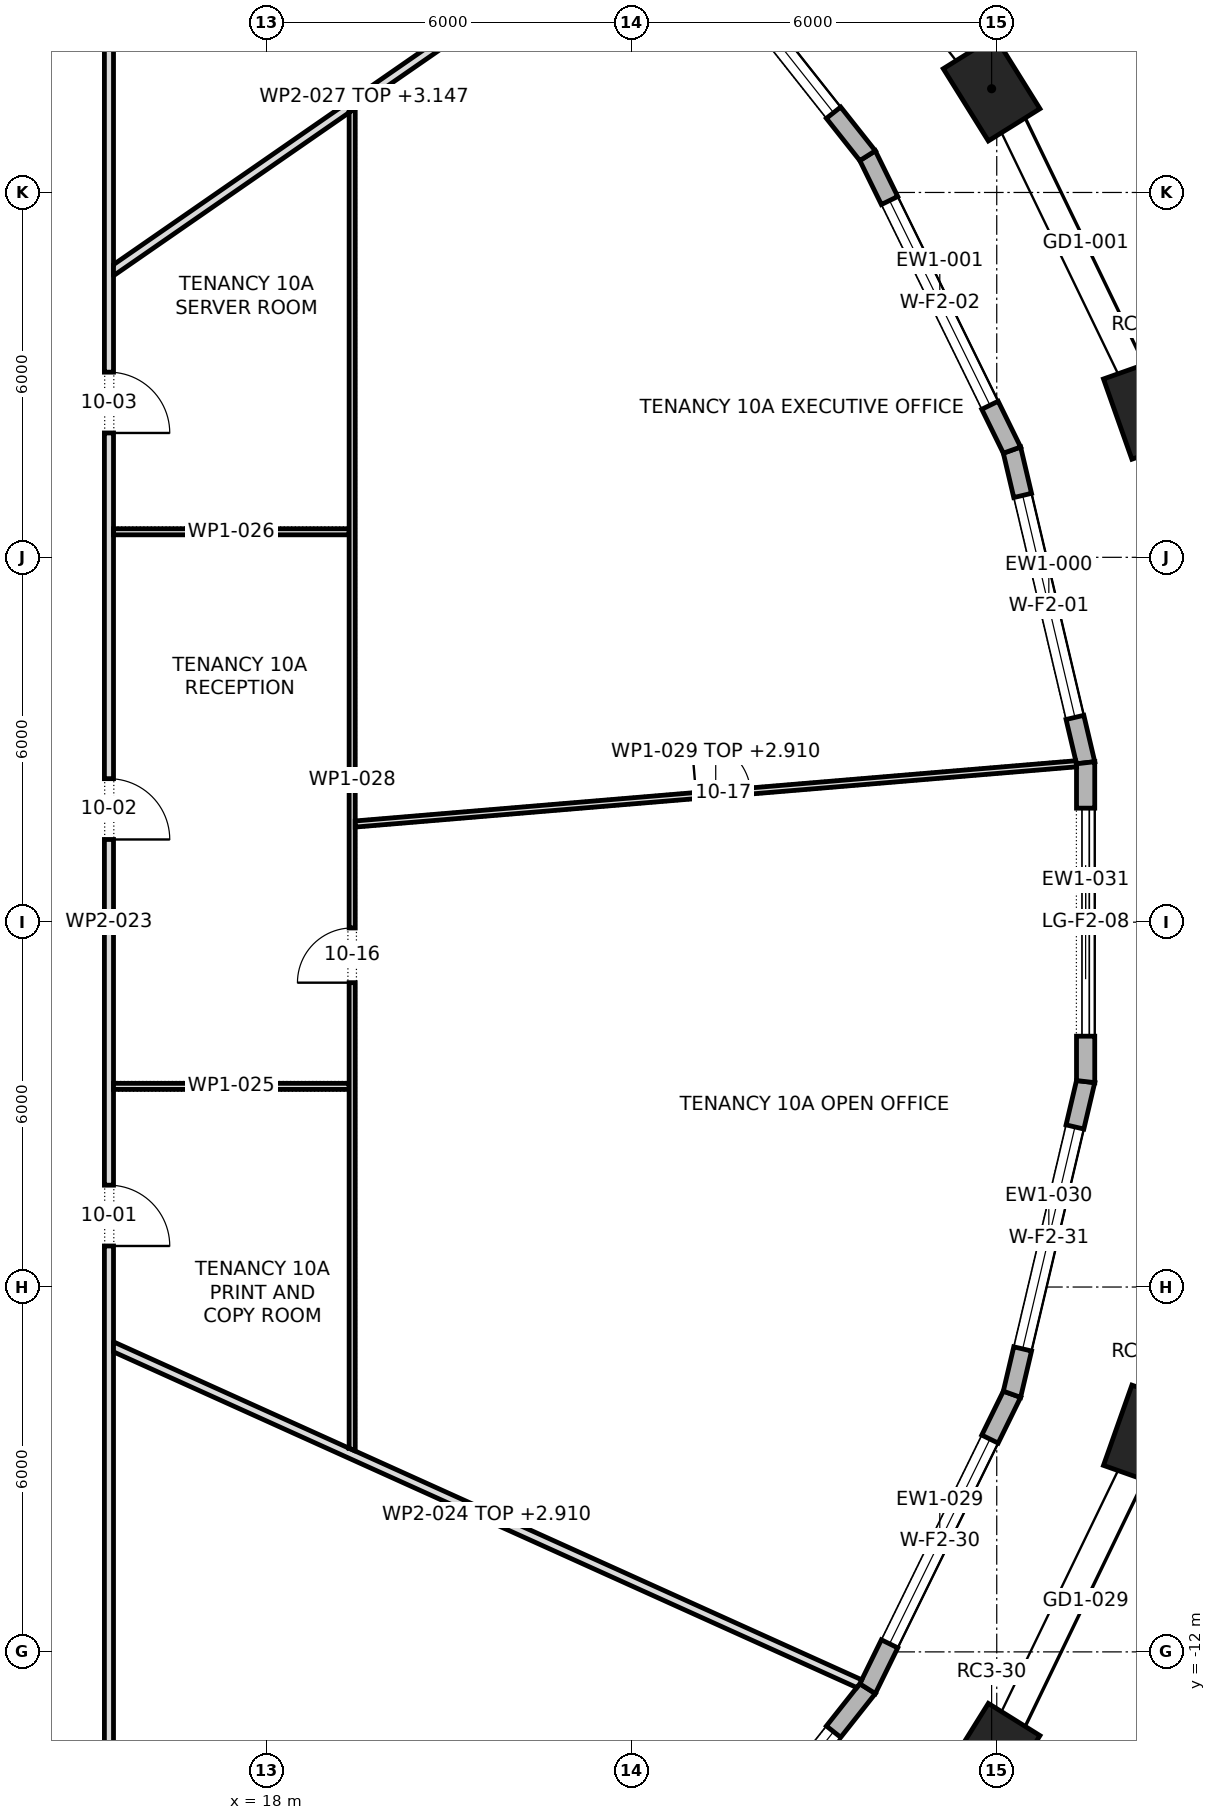
"""IFC4 building model, lengths in metres.
Left out: names, types, materials, properties, quantities, classifications, styles, units other than length and angle.
Written with IfcOpenShell. Run it as: python <this file> out.ifc"""

import sys

from ifc_helpers import new_model, si_unit, direction, frame, frame_2d, origin, origin_2d, place, context, subcontext, project, spatial, polyline, rectangle, outline, extrude, element, fill, save


model = new_model("IFC4")
c1 = context("Model", 3, precision=1e-05, world=origin(), true_north=direction((0.0, 1.0)))
c2 = subcontext(c1, "Body", "Model", "MODEL_VIEW")
j1 = project(units=[si_unit("LENGTHUNIT", "METRE"), si_unit("PLANEANGLEUNIT", "RADIAN")], contexts=[c1])
p1 = place(None, origin())
s1 = spatial("IfcSite", under=j1, at=p1, CompositionType="ELEMENT")
p2 = place(p1, origin())
s2 = spatial("IfcBuilding", under=s1, at=p2, CompositionType="ELEMENT")
p3 = place(p2, frame((0.0, 0.0, 150.7)))
s3 = spatial("IfcBuildingStorey", under=s2, at=p3, CompositionType="ELEMENT", Elevation=150.7)
for number, where, z_axis, x_axis in (
    (1, (32.46, 8.44, 0.0), (0.0, 0.0, 1.0), (-0.334, 0.943, 0.0)),
    (2, (29.916, 13.706, 0.0), (0.0, 0.0, 1.0), (-0.529, 0.849, 0.0)),
    (3, (29.916, -13.706, 0.0), (0.0, 0.0, 1.0), (0.529, 0.849, 0.0)),
    (4, (32.46, -8.44, 0.0), (0.0, 0.0, 1.0), (0.334, 0.943, 0.0)),
):
    element("IfcColumn", number, at=place(p3, frame(where, z_axis=z_axis, x_axis=x_axis)), inside=s3, PredefinedType="COLUMN", context=c2, shape_type="SweptSolid", body=[
        extrude(rectangle(XDim=1.4, YDim=1.0, at=origin_2d()), origin(), (0.0, 0.0, 1.0), 4.2),
    ])
p4 = place(p3, frame((31.462, 2.622, 0.0), z_axis=(0.0, 0.0, 1.0), x_axis=(-0.229289208312, 0.973358340464, 0.0)))
e5 = element("IfcWall", 5, at=p4, inside=s3, PredefinedType="STANDARD", context=c2, shape_type="SweptSolid", body=[
    extrude(outline(polyline([(-0.017, -0.15), (5.299, -0.15), (5.265, 0.15), (0.017, 0.15), (-0.017, -0.15)])), origin(), (0.0, 0.0, 1.0), 3.9),
])
p5 = place(p4, frame((0.766, 0.0, 0.6)))
e6 = element("IfcOpeningElement", 6, at=p5, cuts=e5, PredefinedType="OPENING", context=c2, shape_type="SweptSolid", body=[
    extrude(rectangle(XDim=3.75, YDim=2.85, at=frame_2d((1.875, 1.425))), frame((0.0, 0.162, 0.0), z_axis=(0.0, -1.0, 0.0), x_axis=(1.0, 0.0, 0.0)), (0.0, 0.0, 1.0), 0.324),
])
p6 = place(p3, frame((30.25, 7.763, 0.0), z_axis=(0.0, 0.0, 1.0), x_axis=(-0.440373354088, 0.897814740918, 0.0)))
e7 = element("IfcWall", 7, at=p6, inside=s3, PredefinedType="STANDARD", context=c2, shape_type="SweptSolid", body=[
    extrude(outline(polyline([(-0.017, -0.15), (5.409, -0.15), (5.376, 0.15), (0.017, 0.15), (-0.017, -0.15)])), origin(), (0.0, 0.0, 1.0), 3.9),
])
p7 = place(p6, frame((0.821, 0.0, 0.6)))
e8 = element("IfcOpeningElement", 8, at=p7, cuts=e7, PredefinedType="OPENING", context=c2, shape_type="SweptSolid", body=[
    extrude(rectangle(XDim=3.75, YDim=2.85, at=frame_2d((1.875, 1.425))), frame((0.0, 0.162, 0.0), z_axis=(0.0, -1.0, 0.0), x_axis=(1.0, 0.0, 0.0)), (0.0, 0.0, 1.0), 0.324),
])
p8 = place(p3, frame((27.876, 12.605, 0.0), z_axis=(0.0, 0.0, 1.0), x_axis=(-0.620520511988, 0.784190215574, 0.0)))
e9 = element("IfcWall", 9, at=p8, inside=s3, PredefinedType="STANDARD", context=c2, shape_type="SweptSolid", body=[
    extrude(outline(polyline([(-0.016, -0.15), (5.569, -0.15), (5.538, 0.15), (0.016, 0.15), (-0.016, -0.15)])), origin(), (0.0, 0.0, 1.0), 3.9),
])
p9 = place(p8, frame((0.902, 0.0, 0.6)))
e10 = element("IfcOpeningElement", 10, at=p9, cuts=e9, PredefinedType="OPENING", context=c2, shape_type="SweptSolid", body=[
    extrude(rectangle(XDim=3.75, YDim=2.85, at=frame_2d((1.875, 1.425))), frame((0.0, 0.162, 0.0), z_axis=(0.0, -1.0, 0.0), x_axis=(1.0, 0.0, 0.0)), (0.0, 0.0, 1.0), 0.324),
])
p10 = place(p3, frame((24.43, -16.96, 0.0), z_axis=(0.0, 0.0, 1.0), x_axis=(0.620520511988, 0.784190215574, 0.0)))
e11 = element("IfcWall", 11, at=p10, inside=s3, PredefinedType="STANDARD", context=c2, shape_type="SweptSolid", body=[
    extrude(outline(polyline([(-0.015, -0.15), (5.57, -0.15), (5.537, 0.15), (0.015, 0.15), (-0.015, -0.15)])), origin(), (0.0, 0.0, 1.0), 3.9),
])
p11 = place(p10, frame((0.902, 0.0, 0.6)))
e12 = element("IfcOpeningElement", 12, at=p11, cuts=e11, PredefinedType="OPENING", context=c2, shape_type="SweptSolid", body=[
    extrude(rectangle(XDim=3.75, YDim=2.85, at=frame_2d((1.875, 1.425))), frame((0.0, 0.162, 0.0), z_axis=(0.0, -1.0, 0.0), x_axis=(1.0, 0.0, 0.0)), (0.0, 0.0, 1.0), 0.324),
])
p12 = place(p3, frame((27.876, -12.605, 0.0), z_axis=(0.0, 0.0, 1.0), x_axis=(0.440373354088, 0.897814740918, 0.0)))
e13 = element("IfcWall", 13, at=p12, inside=s3, PredefinedType="STANDARD", context=c2, shape_type="SweptSolid", body=[
    extrude(outline(polyline([(-0.016, -0.15), (5.409, -0.15), (5.376, 0.15), (0.016, 0.15), (-0.016, -0.15)])), origin(), (0.0, 0.0, 1.0), 3.9),
])
p13 = place(p12, frame((0.821, 0.0, 0.6)))
e14 = element("IfcOpeningElement", 14, at=p13, cuts=e13, PredefinedType="OPENING", context=c2, shape_type="SweptSolid", body=[
    extrude(rectangle(XDim=3.75, YDim=2.85, at=frame_2d((1.875, 1.425))), frame((0.0, 0.162, 0.0), z_axis=(0.0, -1.0, 0.0), x_axis=(1.0, 0.0, 0.0)), (0.0, 0.0, 1.0), 0.324),
])
p14 = place(p3, frame((30.25, -7.763, 0.0), z_axis=(0.0, 0.0, 1.0), x_axis=(0.229289208312, 0.973358340464, 0.0)))
e15 = element("IfcWall", 15, at=p14, inside=s3, PredefinedType="STANDARD", context=c2, shape_type="SweptSolid", body=[
    extrude(outline(polyline([(-0.017, -0.15), (5.3, -0.15), (5.265, 0.15), (0.017, 0.15), (-0.017, -0.15)])), origin(), (0.0, 0.0, 1.0), 3.9),
])
p15 = place(p14, frame((0.766, 0.0, 0.6)))
e16 = element("IfcOpeningElement", 16, at=p15, cuts=e15, PredefinedType="OPENING", context=c2, shape_type="SweptSolid", body=[
    extrude(rectangle(XDim=3.75, YDim=2.85, at=frame_2d((1.875, 1.425))), frame((0.0, 0.162, 0.0), z_axis=(0.0, -1.0, 0.0), x_axis=(1.0, 0.0, 0.0)), (0.0, 0.0, 1.0), 0.324),
])
p16 = place(p3, frame((31.462, -2.622, 0.0), z_axis=(0.0, 0.0, 1.0), x_axis=(0.0, 1.0, 0.0)))
e17 = element("IfcWall", 17, at=p16, inside=s3, PredefinedType="STANDARD", context=c2, shape_type="SweptSolid", body=[
    extrude(outline(polyline([(-0.017, -0.15), (5.26, -0.15), (5.226, 0.15), (0.017, 0.15), (-0.017, -0.15)])), origin(), (0.0, 0.0, 1.0), 3.9),
])
p17 = place(p16, frame((0.747, 0.0, 0.0)))
e18 = element("IfcOpeningElement", 18, at=p17, cuts=e17, PredefinedType="OPENING", context=c2, shape_type="SweptSolid", body=[
    extrude(rectangle(XDim=3.75, YDim=3.45, at=frame_2d((1.875, 1.725))), frame((0.0, 0.162, 0.0), z_axis=(0.0, -1.0, 0.0), x_axis=(1.0, 0.0, 0.0)), (0.0, 0.0, 1.0), 0.324),
])
p18 = place(p3, frame((15.4, -15.475, 0.0), z_axis=(0.0, 0.0, 1.0), x_axis=(0.0, 1.0, 0.0)))
e19 = element("IfcWall", 19, at=p18, inside=s3, PredefinedType="PARTITIONING", context=c2, shape_type="SweptSolid", body=[
    extrude(outline(polyline([(0.0, -0.075), (1.935, -0.075), (3.869, -0.075), (5.803, -0.075), (7.738, -0.075), (9.672, -0.075), (11.606, -0.075), (13.541, -0.075), (15.475, -0.075), (17.409, -0.075), (19.344, -0.075), (21.278, -0.075), (23.212, -0.075), (25.147, -0.075), (27.081, -0.075), (29.016, -0.075), (30.95, -0.075), (30.8, 0.075), (28.885, 0.075), (26.969, 0.075), (25.053, 0.075), (23.138, 0.075), (21.222, 0.075), (19.306, 0.075), (17.391, 0.075), (15.475, 0.075), (13.56, 0.075), (11.644, 0.075), (9.728, 0.075), (7.812, 0.075), (5.897, 0.075), (3.981, 0.075), (2.066, 0.075), (0.15, 0.075), (0.0, -0.075)])), origin(), (0.0, 0.0, 1.0), 3.9),
])
p19 = place(p18, frame((10.15, 0.0, 0.0)))
e20 = element("IfcOpeningElement", 20, at=p19, cuts=e19, PredefinedType="OPENING", context=c2, shape_type="SweptSolid", body=[
    extrude(rectangle(XDim=1.0, YDim=2.1, at=frame_2d((0.5, 1.05))), frame((0.0, 0.087, 0.0), z_axis=(0.0, -1.0, 0.0), x_axis=(1.0, 0.0, 0.0)), (0.0, 0.0, 1.0), 0.174),
])
p20 = place(p18, frame((16.835, 0.0, 0.0)))
e21 = element("IfcOpeningElement", 21, at=p20, cuts=e19, PredefinedType="OPENING", context=c2, shape_type="SweptSolid", body=[
    extrude(rectangle(XDim=1.0, YDim=2.1, at=frame_2d((0.5, 1.05))), frame((0.0, 0.087, 0.0), z_axis=(0.0, -1.0, 0.0), x_axis=(1.0, 0.0, 0.0)), (0.0, 0.0, 1.0), 0.174),
])
p21 = place(p18, frame((23.52, 0.0, 0.0)))
e22 = element("IfcOpeningElement", 22, at=p21, cuts=e19, PredefinedType="OPENING", context=c2, shape_type="SweptSolid", body=[
    extrude(rectangle(XDim=1.0, YDim=2.1, at=frame_2d((0.5, 1.05))), frame((0.0, 0.087, 0.0), z_axis=(0.0, -1.0, 0.0), x_axis=(1.0, 0.0, 0.0)), (0.0, 0.0, 1.0), 0.174),
])
p22 = place(p3, frame((15.444, -6.97, 0.0), z_axis=(0.0, 0.0, 1.0), x_axis=(0.911349155517, -0.411634202587, 0.0)))
e23 = element("IfcWall", 23, at=p22, inside=s3, PredefinedType="PARTITIONING", context=c2, shape_type="SweptSolid", body=[
    extrude(outline(polyline([(0.068, -0.075), (1.984, -0.075), (3.9, -0.075), (5.816, -0.075), (7.732, -0.075), (9.648, -0.075), (11.564, -0.075), (13.48, -0.075), (13.5, 0.003), (13.501, 0.062), (13.501, 0.075), (11.652, 0.075), (9.802, 0.075), (7.953, 0.075), (6.103, 0.075), (4.253, 0.075), (4.252, 0.074), (4.252, 0.075), (2.835, 0.075), (1.417, 0.075), (0.0, 0.075), (0.068, -0.075)])), origin(), (0.0, 0.0, 1.0), 2.91),
])
for number, where, z_axis, x_axis in (
    (24, (15.475, -2.7, 0.0), (0.0, 0.0, 1.0), (1.0, 0.0, 0.0)),
    (25, (15.475, 6.42, 0.0), (0.0, 0.0, 1.0), (1.0, 0.0, 0.0)),
):
    element("IfcWall", number, at=place(p3, frame(where, z_axis=z_axis, x_axis=x_axis)), inside=s3, PredefinedType="PARTITIONING", context=c2, shape_type="SweptSolid", body=[
        extrude(rectangle(XDim=3.875, YDim=0.1, at=frame_2d((1.938, 0.0))), origin(), (0.0, 0.0, 1.0), 3.9),
    ])
p23 = place(p3, frame((15.433, 10.692, 0.0), z_axis=(0.0, 0.0, 1.0), x_axis=(0.822108408401, 0.569330980042, 0.0)))
e26 = element("IfcWall", 26, at=p23, inside=s3, PredefinedType="PARTITIONING", context=c2, shape_type="SweptSolid", body=[
    extrude(outline(polyline([(0.0, -0.075), (1.571, -0.075), (3.142, -0.075), (4.713, -0.075), (4.715, -0.072), (4.719, -0.075), (6.503, -0.075), (8.288, -0.075), (10.072, -0.075), (10.072, 0.075), (8.078, 0.075), (6.084, 0.075), (4.091, 0.075), (2.097, 0.075), (0.104, 0.075), (0.0, -0.074), (0.0, -0.075)])), origin(), (0.0, 0.0, 1.0), 3.147),
])
p24 = place(p3, frame((19.4, -8.697, 0.0), z_axis=(0.0, 0.0, 1.0), x_axis=(0.0, 1.0, 0.0)))
e27 = element("IfcWall", 27, at=p24, inside=s3, PredefinedType="PARTITIONING", context=c2, shape_type="SweptSolid", body=[
    extrude(outline(polyline([(22.08, -0.05), (22.08, -0.05), (22.01, 0.05), (20.3, 0.05), (18.589, 0.05), (16.877, 0.05), (15.167, 0.05), (15.167, 0.05), (15.067, 0.05), (15.067, 0.05), (13.262, 0.05), (11.458, 0.05), (9.655, 0.05), (7.851, 0.05), (6.047, 0.05), (6.047, 0.05), (5.947, 0.05), (5.947, 0.05), (3.979, 0.05), (2.012, 0.05), (0.045, 0.05), (0.0, -0.049), (0.0, -0.05), (1.84, -0.05), (3.68, -0.05), (5.52, -0.05), (7.36, -0.05), (9.2, -0.05), (11.04, -0.05), (12.88, -0.05), (14.72, -0.05), (16.56, -0.05), (18.4, -0.05), (20.24, -0.05), (22.08, -0.05)])), origin(), (0.0, 0.0, 1.0), 3.9),
])
p25 = place(p24, frame((7.701, 0.0, 0.0)))
e28 = element("IfcOpeningElement", 28, at=p25, cuts=e27, PredefinedType="OPENING", context=c2, shape_type="SweptSolid", body=[
    extrude(rectangle(XDim=0.9, YDim=2.1, at=frame_2d((0.45, 1.05))), frame((0.0, 0.062, 0.0), z_axis=(0.0, -1.0, 0.0), x_axis=(1.0, 0.0, 0.0)), (0.0, 0.0, 1.0), 0.124),
])
p26 = place(p3, frame((19.446, 1.614, 0.0), z_axis=(0.0, 0.0, 1.0), x_axis=(0.996528479526, 0.083252564492, 0.0)))
e29 = element("IfcWall", 29, at=p26, inside=s3, PredefinedType="PARTITIONING", context=c2, shape_type="SweptSolid", body=[
    extrude(outline(polyline([(0.0, -0.05), (1.984, -0.05), (3.968, -0.05), (5.952, -0.05), (7.935, -0.05), (9.919, -0.05), (11.903, -0.05), (11.903, -0.05), (11.903, 0.027), (11.9, 0.05), (9.918, 0.05), (7.936, 0.05), (5.954, 0.05), (3.972, 0.05), (1.99, 0.05), (0.008, 0.05), (0.0, -0.05)])), origin(), (0.0, 0.0, 1.0), 2.91),
])
p27 = place(p26, frame((5.63, 0.0, 0.0)))
e30 = element("IfcOpeningElement", 30, at=p27, cuts=e29, PredefinedType="OPENING", context=c2, shape_type="SweptSolid", body=[
    extrude(rectangle(XDim=0.9, YDim=2.1, at=frame_2d((0.45, 1.05))), frame((0.0, 0.062, 0.0), z_axis=(0.0, -1.0, 0.0), x_axis=(1.0, 0.0, 0.0)), (0.0, 0.0, 1.0), 0.124),
])
p28 = place(p5, origin())
e31 = element("IfcWindow", 31, at=p28, inside=s3, PartitioningType="TRIPLE_PANEL_VERTICAL", PredefinedType="WINDOW", context=c2, shape_type="SweptSolid", body=[
    extrude(rectangle(XDim=3.75, YDim=2.85, at=frame_2d((1.875, 1.425))), frame((0.0, 0.03, 0.0), z_axis=(0.0, -1.0, 0.0), x_axis=(1.0, 0.0, 0.0)), (0.0, 0.0, 1.0), 0.06),
])
fill(e6, e31)
p29 = place(p7, origin())
e32 = element("IfcWindow", 32, at=p29, inside=s3, PartitioningType="TRIPLE_PANEL_VERTICAL", PredefinedType="WINDOW", context=c2, shape_type="SweptSolid", body=[
    extrude(rectangle(XDim=3.75, YDim=2.85, at=frame_2d((1.875, 1.425))), frame((0.0, 0.03, 0.0), z_axis=(0.0, -1.0, 0.0), x_axis=(1.0, 0.0, 0.0)), (0.0, 0.0, 1.0), 0.06),
])
fill(e8, e32)
p30 = place(p9, origin())
e33 = element("IfcWindow", 33, at=p30, inside=s3, PartitioningType="TRIPLE_PANEL_VERTICAL", PredefinedType="WINDOW", context=c2, shape_type="SweptSolid", body=[
    extrude(rectangle(XDim=3.75, YDim=2.85, at=frame_2d((1.875, 1.425))), frame((0.0, 0.03, 0.0), z_axis=(0.0, -1.0, 0.0), x_axis=(1.0, 0.0, 0.0)), (0.0, 0.0, 1.0), 0.06),
])
fill(e10, e33)
p31 = place(p11, origin())
e34 = element("IfcWindow", 34, at=p31, inside=s3, PartitioningType="TRIPLE_PANEL_VERTICAL", PredefinedType="WINDOW", context=c2, shape_type="SweptSolid", body=[
    extrude(rectangle(XDim=3.75, YDim=2.85, at=frame_2d((1.875, 1.425))), frame((0.0, 0.03, 0.0), z_axis=(0.0, -1.0, 0.0), x_axis=(1.0, 0.0, 0.0)), (0.0, 0.0, 1.0), 0.06),
])
fill(e12, e34)
p32 = place(p13, origin())
e35 = element("IfcWindow", 35, at=p32, inside=s3, PartitioningType="TRIPLE_PANEL_VERTICAL", PredefinedType="WINDOW", context=c2, shape_type="SweptSolid", body=[
    extrude(rectangle(XDim=3.75, YDim=2.85, at=frame_2d((1.875, 1.425))), frame((0.0, 0.03, 0.0), z_axis=(0.0, -1.0, 0.0), x_axis=(1.0, 0.0, 0.0)), (0.0, 0.0, 1.0), 0.06),
])
fill(e14, e35)
p33 = place(p15, origin())
e36 = element("IfcWindow", 36, at=p33, inside=s3, PartitioningType="TRIPLE_PANEL_VERTICAL", PredefinedType="WINDOW", context=c2, shape_type="SweptSolid", body=[
    extrude(rectangle(XDim=3.75, YDim=2.85, at=frame_2d((1.875, 1.425))), frame((0.0, 0.03, 0.0), z_axis=(0.0, -1.0, 0.0), x_axis=(1.0, 0.0, 0.0)), (0.0, 0.0, 1.0), 0.06),
])
fill(e16, e36)
p34 = place(p17, origin())
e37 = element("IfcDoor", 37, at=p34, inside=s3, OperationType="DOUBLE_DOOR_SLIDING", PredefinedType="DOOR", context=c2, shape_type="SweptSolid", body=[
    extrude(rectangle(XDim=3.75, YDim=3.45, at=frame_2d((1.875, 1.725))), frame((0.0, 0.025, 0.0), z_axis=(0.0, -1.0, 0.0), x_axis=(1.0, 0.0, 0.0)), (0.0, 0.0, 1.0), 0.05),
])
fill(e18, e37)
p35 = place(p19, frame((1.0, 0.0, 0.0), z_axis=(0.0, 0.0, 1.0), x_axis=(-1.0, 0.0, 0.0)))
e38 = element("IfcDoor", 38, at=p35, inside=s3, OperationType="SINGLE_SWING_LEFT", PredefinedType="DOOR", context=c2, shape_type="SweptSolid", body=[
    extrude(rectangle(XDim=1.0, YDim=2.1, at=frame_2d((0.5, 1.05))), frame((0.0, 0.025, 0.0), z_axis=(0.0, -1.0, 0.0), x_axis=(1.0, 0.0, 0.0)), (0.0, 0.0, 1.0), 0.05),
])
fill(e20, e38)
p36 = place(p20, frame((1.0, 0.0, 0.0), z_axis=(0.0, 0.0, 1.0), x_axis=(-1.0, 0.0, 0.0)))
e39 = element("IfcDoor", 39, at=p36, inside=s3, OperationType="SINGLE_SWING_LEFT", PredefinedType="DOOR", context=c2, shape_type="SweptSolid", body=[
    extrude(rectangle(XDim=1.0, YDim=2.1, at=frame_2d((0.5, 1.05))), frame((0.0, 0.025, 0.0), z_axis=(0.0, -1.0, 0.0), x_axis=(1.0, 0.0, 0.0)), (0.0, 0.0, 1.0), 0.05),
])
fill(e21, e39)
p37 = place(p21, frame((1.0, 0.0, 0.0), z_axis=(0.0, 0.0, 1.0), x_axis=(-1.0, 0.0, 0.0)))
e40 = element("IfcDoor", 40, at=p37, inside=s3, OperationType="SINGLE_SWING_LEFT", PredefinedType="DOOR", context=c2, shape_type="SweptSolid", body=[
    extrude(rectangle(XDim=1.0, YDim=2.1, at=frame_2d((0.5, 1.05))), frame((0.0, 0.025, 0.0), z_axis=(0.0, -1.0, 0.0), x_axis=(1.0, 0.0, 0.0)), (0.0, 0.0, 1.0), 0.05),
])
fill(e22, e40)
p38 = place(p25, origin())
e41 = element("IfcDoor", 41, at=p38, inside=s3, OperationType="SINGLE_SWING_RIGHT", PredefinedType="DOOR", context=c2, shape_type="SweptSolid", body=[
    extrude(rectangle(XDim=0.9, YDim=2.1, at=frame_2d((0.45, 1.05))), frame((0.0, 0.025, 0.0), z_axis=(0.0, -1.0, 0.0), x_axis=(1.0, 0.0, 0.0)), (0.0, 0.0, 1.0), 0.05),
])
fill(e28, e41)
p39 = place(p27, origin())
e42 = element("IfcDoor", 42, at=p39, inside=s3, OperationType="SINGLE_SWING_RIGHT", PredefinedType="DOOR", context=c2, shape_type="SweptSolid", body=[
    extrude(rectangle(XDim=0.9, YDim=2.1, at=frame_2d((0.45, 1.05))), frame((0.0, 0.025, 0.0), z_axis=(0.0, -1.0, 0.0), x_axis=(1.0, 0.0, 0.0)), (0.0, 0.0, 1.0), 0.05),
])
fill(e30, e42)
save(model, sys.argv[1])
